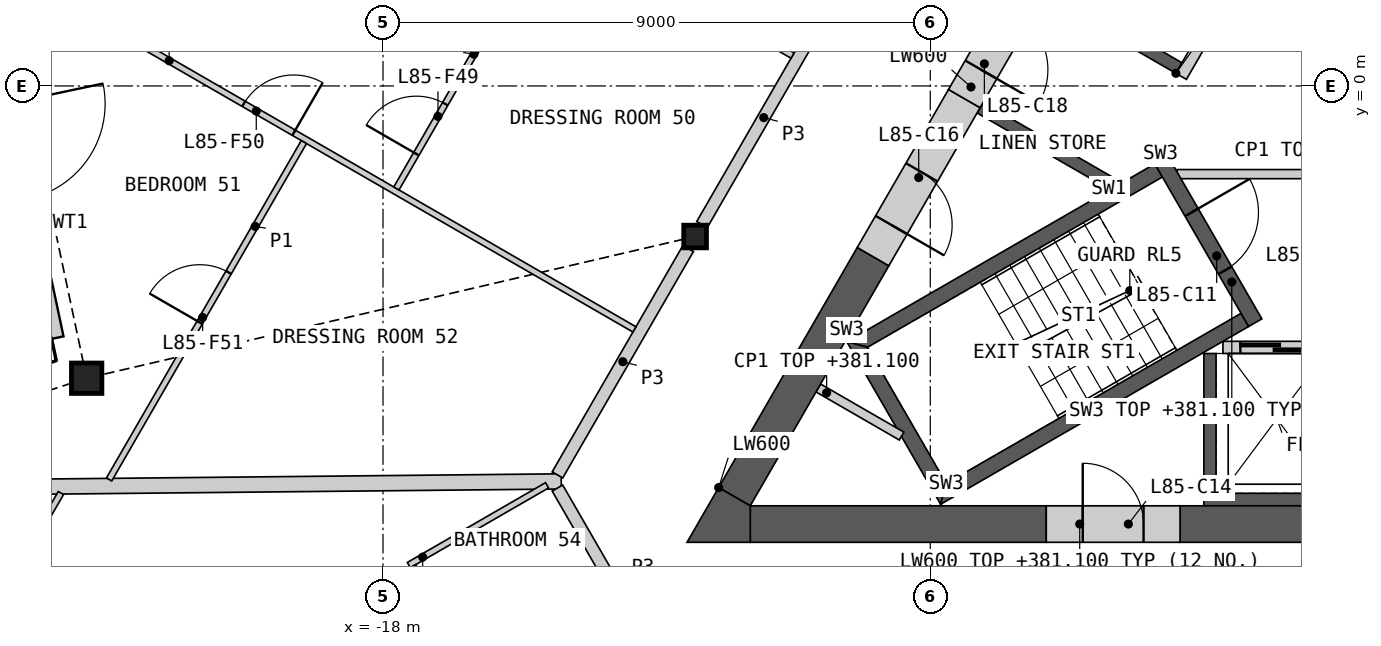
"""IFC4 building model, lengths in metres.
Left out: names, types, materials, properties, quantities, classifications, styles, units other than length and angle.
Written with IfcOpenShell. Run it as: python <this file> out.ifc"""

import sys

from ifc_helpers import new_model, si_unit, direction, frame, frame_2d, origin, origin_2d, place, context, subcontext, project, spatial, polyline, rectangle, hollow_rectangle, i_section, outline, extrude, element, fill, save


model = new_model("IFC4")
c1 = context("Model", 3, precision=1e-05, world=origin(), true_north=direction((0.0, 1.0)))
c2 = subcontext(c1, "Body", "Model", "MODEL_VIEW")
j1 = project(units=[si_unit("LENGTHUNIT", "METRE"), si_unit("PLANEANGLEUNIT", "RADIAN")], contexts=[c1])
p1 = place(None, origin())
s1 = spatial("IfcSite", under=j1, at=p1, CompositionType="ELEMENT")
p2 = place(p1, origin())
s2 = spatial("IfcBuilding", under=s1, at=p2, CompositionType="ELEMENT")
p3 = place(p2, frame((0.0, 0.0, 378.0)))
s3 = spatial("IfcBuildingStorey", under=s2, at=p3, CompositionType="ELEMENT", Elevation=378.0)
p4 = place(p3, frame((-22.874, -4.807, 0.0), z_axis=(0.0, 0.0, 1.0), x_axis=(1.0, 0.0, 0.0)))
e1 = element("IfcColumn", 1, at=p4, inside=s3, PredefinedType="COLUMN", context=c2, shape_type="SweptSolid", body=[
    extrude(hollow_rectangle(XDim=0.5, YDim=0.5, WallThickness=0.03, at=origin_2d()), origin(), (0.0, 0.0, 1.0), 3.4),
])
p5 = place(p3, frame((-12.868, -2.476, 0.0), z_axis=(0.0, 0.0, 1.0), x_axis=(1.0, 0.0, 0.0)))
e2 = element("IfcColumn", 2, at=p5, inside=s3, PredefinedType="COLUMN", context=c2, shape_type="SweptSolid", body=[
    extrude(i_section(OverallWidth=0.374, OverallDepth=0.372, WebThickness=0.016, FlangeThickness=0.026, at=origin_2d()), origin(), (0.0, 0.0, 1.0), 3.4),
])
p6 = place(p3, frame((-24.687, 2.137, 0.0), z_axis=(0.0, 0.0, 1.0), x_axis=(0.207904718109, -0.978149082803, 0.0)))
e3 = element("IfcWall", 3, at=p6, inside=s3, PredefinedType="SOLIDWALL", context=c2, shape_type="SweptSolid", body=[
    extrude(rectangle(XDim=6.416, YDim=0.2, at=frame_2d((3.208, 0.0))), origin(), (0.0, 0.0, 1.0), 2.634),
])
p7 = place(p6, frame((2.484, 0.0, 0.0)))
e4 = element("IfcOpeningElement", 4, at=p7, cuts=e3, PredefinedType="OPENING", context=c2, shape_type="SweptSolid", body=[
    extrude(rectangle(XDim=1.6, YDim=2.25, at=frame_2d((0.8, 1.125))), frame((0.0, 0.11, 0.0), z_axis=(0.0, -1.0, 0.0), x_axis=(1.0, 0.0, 0.0)), (0.0, 0.0, 1.0), 0.22),
])
p8 = place(p3, origin())
e5 = element("IfcWall", 5, at=p8, inside=s3, PredefinedType="SHEAR", context=c2, shape_type="SweptSolid", body=[
    extrude(outline(polyline([(4.5, -4.4), (4.5, -6.906), (-4.5, -6.906), (-4.5, -4.4), (-4.3, -4.4), (-4.3, -6.7), (-2.3, -6.7), (-2.3, -4.4), (-2.1, -4.4), (-2.1, -6.7), (-0.1, -6.7), (-0.1, -4.4), (0.1, -4.4), (0.1, -6.7), (2.1, -6.7), (2.1, -4.4), (2.3, -4.4), (2.3, -6.7), (4.3, -6.7), (4.3, -4.4), (4.5, -4.4)])), origin(), (0.0, 0.0, 1.0), 3.1),
])
p9 = place(p3, frame((-4.187, -4.3, 0.0), z_axis=(0.0, 0.0, 1.0), x_axis=(1.0, 0.0, 0.0)))
e6 = element("IfcWall", 6, at=p9, inside=s3, PredefinedType="SOLIDWALL", context=c2, shape_type="SweptSolid", body=[
    extrude(rectangle(XDim=8.373, YDim=0.2, at=frame_2d((4.187, 0.0))), origin(), (0.0, 0.0, 1.0), 3.1),
])
p10 = place(p9, frame((0.287, 0.0, 0.0)))
e7 = element("IfcOpeningElement", 7, at=p10, cuts=e6, PredefinedType="OPENING", context=c2, shape_type="SweptSolid", body=[
    extrude(rectangle(XDim=1.2, YDim=2.1, at=frame_2d((0.6, 1.05))), frame((0.0, 0.11, 0.0), z_axis=(0.0, -1.0, 0.0), x_axis=(1.0, 0.0, 0.0)), (0.0, 0.0, 1.0), 0.22),
])
p11 = place(p9, frame((2.387, 0.0, 0.0)))
e8 = element("IfcOpeningElement", 8, at=p11, cuts=e6, PredefinedType="OPENING", context=c2, shape_type="SweptSolid", body=[
    extrude(rectangle(XDim=1.4, YDim=2.1, at=frame_2d((0.7, 1.05))), frame((0.0, 0.11, 0.0), z_axis=(0.0, -1.0, 0.0), x_axis=(1.0, 0.0, 0.0)), (0.0, 0.0, 1.0), 0.22),
])
p12 = place(p9, frame((4.737, 0.0, 0.0)))
e9 = element("IfcOpeningElement", 9, at=p12, cuts=e6, PredefinedType="OPENING", context=c2, shape_type="SweptSolid", body=[
    extrude(rectangle(XDim=1.1, YDim=2.1, at=frame_2d((0.55, 1.05))), frame((0.0, 0.11, 0.0), z_axis=(0.0, -1.0, 0.0), x_axis=(1.0, 0.0, 0.0)), (0.0, 0.0, 1.0), 0.22),
])
p13 = place(p9, frame((6.887, 0.0, 0.0)))
e10 = element("IfcOpeningElement", 10, at=p13, cuts=e6, PredefinedType="OPENING", context=c2, shape_type="SweptSolid", body=[
    extrude(rectangle(XDim=1.2, YDim=2.1, at=frame_2d((0.6, 1.05))), frame((0.0, 0.11, 0.0), z_axis=(0.0, -1.0, 0.0), x_axis=(1.0, 0.0, 0.0)), (0.0, 0.0, 1.0), 0.22),
])
p14 = place(p3, origin())
e11 = element("IfcWall", 11, at=p14, inside=s3, PredefinedType="SHEAR", context=c2, shape_type="SweptSolid", body=[
    extrude(outline(polyline([(-6.061, -1.697), (-8.231, -0.444), (-8.131, -0.271), (-5.96, -1.524), (-6.061, -1.697)])), origin(), (0.0, 0.0, 1.0), 3.1),
])
p15 = place(p3, origin())
e12 = element("IfcWall", 12, at=p15, inside=s3, PredefinedType="SHEAR", context=c2, shape_type="SweptSolid", body=[
    extrude(outline(polyline([(-4.96, 0.208), (-7.131, 1.461), (-3.731, 7.35), (-1.561, 6.097), (-1.66, 5.924), (-3.652, 7.074), (-6.852, 1.531), (-4.861, 0.381), (-4.96, 0.208)])), origin(), (0.0, 0.0, 1.0), 3.1),
])
p16 = place(p3, frame((-1.631, 5.776, 0.0), z_axis=(0.0, 0.0, 1.0), x_axis=(-0.499992876559, -0.866029516466, 0.0)))
e13 = element("IfcWall", 13, at=p16, inside=s3, PredefinedType="SOLIDWALL", context=c2, shape_type="SweptSolid", body=[
    extrude(rectangle(XDim=6.486, YDim=0.2, at=frame_2d((3.243, 0.0))), origin(), (0.0, 0.0, 1.0), 3.1),
])
p17 = place(p16, frame((2.637, 0.0, 0.0)))
e14 = element("IfcOpeningElement", 14, at=p17, cuts=e13, PredefinedType="OPENING", context=c2, shape_type="SweptSolid", body=[
    extrude(rectangle(XDim=0.9, YDim=2.1, at=frame_2d((0.45, 1.05))), frame((0.0, 0.11, 0.0), z_axis=(0.0, -1.0, 0.0), x_axis=(1.0, 0.0, 0.0)), (0.0, 0.0, 1.0), 0.22),
])
p18 = place(p3, frame((-4.941, -1.45, 0.0), z_axis=(0.0, 0.0, 1.0), x_axis=(1.0, 0.0, 0.0)))
e15 = element("IfcWall", 15, at=p18, inside=s3, PredefinedType="PARTITIONING", context=c2, shape_type="SweptSolid", body=[
    extrude(rectangle(XDim=9.882, YDim=0.15, at=frame_2d((4.941, 0.0))), origin(), (0.0, 0.0, 1.0), 3.1),
])
p19 = place(p18, frame((4.391, 0.0, 0.0)))
e16 = element("IfcOpeningElement", 16, at=p19, cuts=e15, PredefinedType="OPENING", context=c2, shape_type="SweptSolid", body=[
    extrude(rectangle(XDim=1.1, YDim=2.1, at=frame_2d((0.55, 1.05))), frame((0.0, 0.085, 0.0), z_axis=(0.0, -1.0, 0.0), x_axis=(1.0, 0.0, 0.0)), (0.0, 0.0, 1.0), 0.17),
])
p20 = place(p3, origin())
e17 = element("IfcWall", 17, at=p20, inside=s3, PredefinedType="SHEAR", context=c2, shape_type="SweptSolid", body=[
    extrude(outline(polyline([(-5.307, -1.281), (-10.374, -4.206), (-10.032, -4.298), (-5.182, -1.498), (-5.307, -1.281)])), origin(), (0.0, 0.0, 1.0), 3.1),
])
p21 = place(p3, origin())
e18 = element("IfcWall", 18, at=p21, inside=s3, PredefinedType="SHEAR", context=c2, shape_type="SweptSolid", body=[
    extrude(outline(polyline([(-10.374, -4.206), (-8.83, -6.881), (-8.738, -6.539), (-10.032, -4.298), (-10.374, -4.206)])), origin(), (0.0, 0.0, 1.0), 3.1),
])
p22 = place(p3, origin())
e19 = element("IfcWall", 19, at=p22, inside=s3, PredefinedType="SHEAR", context=c2, shape_type="SweptSolid", body=[
    extrude(outline(polyline([(-8.738, -6.539), (-8.83, -6.881), (-3.763, -3.956), (-3.888, -3.739), (-8.738, -6.539)])), origin(), (0.0, 0.0, 1.0), 3.1),
])
p23 = place(p3, frame((-5.199, -1.219, 0.0), z_axis=(0.0, 0.0, 1.0), x_axis=(0.499982516597, -0.866035497597, 0.0)))
e20 = element("IfcWall", 20, at=p23, inside=s3, PredefinedType="SHEAR", context=c2, shape_type="SweptSolid", body=[
    extrude(rectangle(XDim=3.088, YDim=0.25, at=frame_2d((1.544, 0.0))), origin(), (0.0, 0.0, 1.0), 3.1),
])
p24 = place(p23, frame((0.994, 0.0, 0.0)))
e21 = element("IfcOpeningElement", 21, at=p24, cuts=e20, PredefinedType="OPENING", context=c2, shape_type="SweptSolid", body=[
    extrude(rectangle(XDim=1.1, YDim=2.1, at=frame_2d((0.55, 1.05))), frame((0.0, 0.135, 0.0), z_axis=(0.0, -1.0, 0.0), x_axis=(1.0, 0.0, 0.0)), (0.0, 0.0, 1.0), 0.27),
])
p25 = place(p3, frame((-10.842, -4.967, 0.0), z_axis=(0.0, 0.0, 1.0), x_axis=(0.866098216386, -0.499873863663, 0.0)))
e22 = element("IfcWall", 22, at=p25, inside=s3, PredefinedType="PARTITIONING", context=c2, shape_type="SweptSolid", body=[
    extrude(rectangle(XDim=1.582, YDim=0.15, at=frame_2d((0.791, 0.0))), origin(), (0.0, 0.0, 1.0), 3.1),
])
p26 = place(p3, frame((-4.892, -7.206, 0.0), z_axis=(0.0, 0.0, 1.0), x_axis=(1.0, 0.0, 0.0)))
e23 = element("IfcWall", 23, at=p26, inside=s3, PredefinedType="SHEAR", context=c2, shape_type="SweptSolid", body=[
    extrude(rectangle(XDim=16.853, YDim=0.6, at=frame_2d((8.426, 0.0))), origin(), (0.0, 0.0, 1.0), 3.1),
])
p27 = place(p3, frame((-11.961, -7.206, 0.0), z_axis=(0.0, 0.0, 1.0), x_axis=(1.0, 0.0, 0.0)))
e24 = element("IfcWall", 24, at=p27, inside=s3, PredefinedType="SHEAR", context=c2, shape_type="SweptSolid", body=[
    extrude(rectangle(XDim=4.868, YDim=0.6, at=frame_2d((2.434, 0.0))), origin(), (0.0, 0.0, 1.0), 3.1),
])
p28 = place(p3, frame((-9.941, -2.807, 0.0), z_axis=(0.0, 0.0, 1.0), x_axis=(-0.500020646047, -0.866013483456, 0.0)))
e25 = element("IfcWall", 25, at=p28, inside=s3, PredefinedType="SHEAR", context=c2, shape_type="SweptSolid", body=[
    extrude(rectangle(XDim=4.559, YDim=0.6, at=frame_2d((2.28, 0.0))), origin(), (0.0, 0.0, 1.0), 3.1),
])
p29 = place(p3, origin())
e26 = element("IfcWall", 26, at=p29, inside=s3, PredefinedType="SHEAR", context=c2, shape_type="SweptSolid", body=[
    extrude(outline(polyline([(-12.48, -6.606), (-11.961, -6.906), (-11.961, -7.506), (-13.0, -7.506), (-12.48, -6.606)])), origin(), (0.0, 0.0, 1.0), 3.1),
])
p30 = place(p3, frame((-7.092, -7.206, 0.0), z_axis=(0.0, 0.0, 1.0), x_axis=(1.0, 0.0, 0.0)))
e27 = element("IfcWall", 27, at=p30, inside=s3, PredefinedType="SHEAR", context=c2, shape_type="SweptSolid", body=[
    extrude(rectangle(XDim=2.2, YDim=0.6, at=frame_2d((1.1, 0.0))), origin(), (0.0, 0.0, 1.0), 3.1),
])
p31 = place(p30, frame((0.6, 0.0, 0.0)))
e28 = element("IfcOpeningElement", 28, at=p31, cuts=e27, PredefinedType="OPENING", context=c2, shape_type="SweptSolid", body=[
    extrude(rectangle(XDim=1.0, YDim=2.1, at=frame_2d((0.5, 1.05))), frame((0.0, 0.31, 0.0), z_axis=(0.0, -1.0, 0.0), x_axis=(1.0, 0.0, 0.0)), (0.0, 0.0, 1.0), 0.62),
])
p32 = place(p3, frame((-8.44, -0.208, 0.0), z_axis=(0.0, 0.0, 1.0), x_axis=(-0.499997052475, -0.866027105532, 0.0)))
e29 = element("IfcWall", 29, at=p32, inside=s3, PredefinedType="SHEAR", context=c2, shape_type="SweptSolid", body=[
    extrude(rectangle(XDim=3.001, YDim=0.6, at=frame_2d((1.501, 0.0))), origin(), (0.0, 0.0, 1.0), 3.1),
])
p33 = place(p32, frame((1.4, 0.0, 0.0)))
e30 = element("IfcOpeningElement", 30, at=p33, cuts=e29, PredefinedType="OPENING", context=c2, shape_type="SweptSolid", body=[
    extrude(rectangle(XDim=1.0, YDim=2.1, at=frame_2d((0.5, 1.05))), frame((0.0, 0.31, 0.0), z_axis=(0.0, -1.0, 0.0), x_axis=(1.0, 0.0, 0.0)), (0.0, 0.0, 1.0), 0.62),
])
p34 = place(p3, frame((-7.34, 1.698, 0.0), z_axis=(0.0, 0.0, 1.0), x_axis=(-0.50002983664, -0.866008176907, 0.0)))
e31 = element("IfcWall", 31, at=p34, inside=s3, PredefinedType="SHEAR", context=c2, shape_type="SweptSolid", body=[
    extrude(rectangle(XDim=2.2, YDim=0.6, at=frame_2d((1.1, 0.0))), origin(), (0.0, 0.0, 1.0), 3.1),
])
p35 = place(p34, frame((0.55, 0.0, 0.0)))
e32 = element("IfcOpeningElement", 32, at=p35, cuts=e31, PredefinedType="OPENING", context=c2, shape_type="SweptSolid", body=[
    extrude(rectangle(XDim=1.1, YDim=2.1, at=frame_2d((0.55, 1.05))), frame((0.0, 0.31, 0.0), z_axis=(0.0, -1.0, 0.0), x_axis=(1.0, 0.0, 0.0)), (0.0, 0.0, 1.0), 0.62),
])
p36 = place(p3, frame((-29.883, -6.654, 0.0), z_axis=(0.0, 0.0, 1.0), x_axis=(0.999949143254, 0.010085182526, 0.0)))
e33 = element("IfcWall", 33, at=p36, inside=s3, PredefinedType="PARTITIONING", context=c2, shape_type="SweptSolid", body=[
    extrude(rectangle(XDim=14.815, YDim=0.25, at=frame_2d((7.408, 0.0))), origin(), (0.0, 0.0, 1.0), 2.33),
])
p37 = place(p3, frame((-12.754, -2.279, 0.0), z_axis=(0.0, 0.0, 1.0), x_axis=(0.500001682468, 0.866024432409, 0.0)))
e34 = element("IfcWall", 34, at=p37, inside=s3, PredefinedType="PARTITIONING", context=c2, shape_type="SweptSolid", body=[
    extrude(rectangle(XDim=8.124, YDim=0.2, at=frame_2d((4.062, 0.0))), origin(), (0.0, 0.0, 1.0), 3.1),
])
p38 = place(p37, frame((3.762, 0.0, 0.0)))
e35 = element("IfcOpeningElement", 35, at=p38, cuts=e34, PredefinedType="OPENING", context=c2, shape_type="SweptSolid", body=[
    extrude(rectangle(XDim=1.0, YDim=2.1, at=frame_2d((0.5, 1.05))), frame((0.0, 0.11, 0.0), z_axis=(0.0, -1.0, 0.0), x_axis=(1.0, 0.0, 0.0)), (0.0, 0.0, 1.0), 0.22),
])
p39 = place(p3, frame((-15.131, -6.397, 0.0), z_axis=(0.0, 0.0, 1.0), x_axis=(0.499986217557, 0.866033360935, 0.0)))
e36 = element("IfcWall", 36, at=p39, inside=s3, PredefinedType="PARTITIONING", context=c2, shape_type="SweptSolid", body=[
    extrude(rectangle(XDim=4.3, YDim=0.2, at=frame_2d((2.15, 0.0))), origin(), (0.0, 0.0, 1.0), 3.1),
])
p40 = place(p3, frame((-15.131, -6.614, 0.0), z_axis=(0.0, 0.0, 1.0), x_axis=(0.499967746641, -0.866044024469, 0.0)))
e37 = element("IfcWall", 37, at=p40, inside=s3, PredefinedType="PARTITIONING", context=c2, shape_type="SweptSolid", body=[
    extrude(rectangle(XDim=3.676, YDim=0.2, at=frame_2d((1.838, 0.0))), origin(), (0.0, 0.0, 1.0), 3.1),
])
p41 = place(p40, frame((2.426, 0.0, 0.0)))
e38 = element("IfcOpeningElement", 38, at=p41, cuts=e37, PredefinedType="OPENING", context=c2, shape_type="SweptSolid", body=[
    extrude(rectangle(XDim=1.0, YDim=2.1, at=frame_2d((0.5, 1.05))), frame((0.0, 0.11, 0.0), z_axis=(0.0, -1.0, 0.0), x_axis=(1.0, 0.0, 0.0)), (0.0, 0.0, 1.0), 0.22),
])
p42 = place(p3, frame((-24.069, 1.887, 0.0), z_axis=(0.0, 0.0, 1.0), x_axis=(0.866023404247, -0.500003463284, 0.0)))
e39 = element("IfcWall", 39, at=p42, inside=s3, PredefinedType="PARTITIONING", context=c2, shape_type="SweptSolid", body=[
    extrude(rectangle(XDim=11.782, YDim=0.1, at=frame_2d((5.891, 0.0))), origin(), (0.0, 0.0, 1.0), 2.33),
])
p43 = place(p42, frame((4.363, 0.0, 0.0)))
e40 = element("IfcOpeningElement", 40, at=p43, cuts=e39, PredefinedType="OPENING", context=c2, shape_type="SweptSolid", body=[
    extrude(rectangle(XDim=0.95, YDim=2.1, at=frame_2d((0.475, 1.05))), frame((0.0, 0.06, 0.0), z_axis=(0.0, -1.0, 0.0), x_axis=(1.0, 0.0, 0.0)), (0.0, 0.0, 1.0), 0.12),
])
p44 = place(p3, frame((-17.414, 4.049, 0.0), z_axis=(0.0, 0.0, 1.0), x_axis=(0.866033839264, -0.499985389037, 0.0)))
e41 = element("IfcWall", 41, at=p44, inside=s3, PredefinedType="PARTITIONING", context=c2, shape_type="SweptSolid", body=[
    extrude(rectangle(XDim=7.1, YDim=0.1, at=frame_2d((3.55, 0.0))), origin(), (0.0, 0.0, 1.0), 2.33),
])
p45 = place(p44, frame((1.158, 0.0, 0.0)))
e42 = element("IfcOpeningElement", 42, at=p45, cuts=e41, PredefinedType="OPENING", context=c2, shape_type="SweptSolid", body=[
    extrude(rectangle(XDim=0.95, YDim=2.1, at=frame_2d((0.475, 1.05))), frame((0.0, 0.06, 0.0), z_axis=(0.0, -1.0, 0.0), x_axis=(1.0, 0.0, 0.0)), (0.0, 0.0, 1.0), 0.12),
])
p46 = place(p3, frame((-22.505, -6.472, 0.0), z_axis=(0.0, 0.0, 1.0), x_axis=(0.499999516514, 0.866025682925, 0.0)))
e43 = element("IfcWall", 43, at=p46, inside=s3, PredefinedType="PARTITIONING", context=c2, shape_type="SweptSolid", body=[
    extrude(rectangle(XDim=6.407, YDim=0.1, at=frame_2d((3.204, 0.0))), origin(), (0.0, 0.0, 1.0), 2.33),
])
p47 = place(p46, frame((2.981, 0.0, 0.0)))
e44 = element("IfcOpeningElement", 44, at=p47, cuts=e43, PredefinedType="OPENING", context=c2, shape_type="SweptSolid", body=[
    extrude(rectangle(XDim=0.95, YDim=2.1, at=frame_2d((0.475, 1.05))), frame((0.0, 0.06, 0.0), z_axis=(0.0, -1.0, 0.0), x_axis=(1.0, 0.0, 0.0)), (0.0, 0.0, 1.0), 0.12),
])
p48 = place(p3, frame((-17.78, -1.686, 0.0), z_axis=(0.0, 0.0, 1.0), x_axis=(0.500005610874, 0.86602216432, 0.0)))
e45 = element("IfcWall", 45, at=p48, inside=s3, PredefinedType="PARTITIONING", context=c2, shape_type="SweptSolid", body=[
    extrude(rectangle(XDim=5.1, YDim=0.1, at=frame_2d((2.55, 0.0))), origin(), (0.0, 0.0, 1.0), 2.33),
])
p49 = place(p48, frame((0.656, 0.0, 0.0)))
e46 = element("IfcOpeningElement", 46, at=p49, cuts=e45, PredefinedType="OPENING", context=c2, shape_type="SweptSolid", body=[
    extrude(rectangle(XDim=0.95, YDim=2.1, at=frame_2d((0.475, 1.05))), frame((0.0, 0.06, 0.0), z_axis=(0.0, -1.0, 0.0), x_axis=(1.0, 0.0, 0.0)), (0.0, 0.0, 1.0), 0.12),
])
p50 = place(p3, frame((-24.726, -9.169, 0.0), z_axis=(0.0, 0.0, 1.0), x_axis=(0.499971481985, 0.866041868042, 0.0)))
e47 = element("IfcWall", 47, at=p50, inside=s3, PredefinedType="PARTITIONING", context=c2, shape_type="SweptSolid", body=[
    extrude(rectangle(XDim=2.857, YDim=0.1, at=frame_2d((1.429, 0.0))), origin(), (0.0, 0.0, 1.0), 2.33),
])
p51 = place(p3, frame((-17.575, -7.881, 0.0), z_axis=(0.0, 0.0, 1.0), x_axis=(0.866036909293, 0.499980071345, 0.0)))
e48 = element("IfcWall", 48, at=p51, inside=s3, PredefinedType="PARTITIONING", context=c2, shape_type="SweptSolid", body=[
    extrude(rectangle(XDim=2.625, YDim=0.1, at=frame_2d((1.312, 0.0))), origin(), (0.0, 0.0, 1.0), 2.33),
])
p52 = place(p3, frame((-17.507, -7.899, 0.0), z_axis=(0.0, 0.0, 1.0), x_axis=(0.500011643316, -0.866018681408, 0.0)))
e49 = element("IfcWall", 49, at=p52, inside=s3, PredefinedType="PARTITIONING", context=c2, shape_type="SweptSolid", body=[
    extrude(rectangle(XDim=1.973, YDim=0.1, at=frame_2d((0.987, 0.0))), origin(), (0.0, 0.0, 1.0), 2.33),
])
p53 = place(p10, origin())
e50 = element("IfcDoor", 50, at=p53, inside=s3, OperationType="SLIDING_TO_LEFT", PredefinedType="DOOR", context=c2, shape_type="SweptSolid", body=[
    extrude(rectangle(XDim=1.2, YDim=2.1, at=frame_2d((0.6, 1.05))), frame((0.0, 0.025, 0.0), z_axis=(0.0, -1.0, 0.0), x_axis=(1.0, 0.0, 0.0)), (0.0, 0.0, 1.0), 0.05),
])
fill(e7, e50)
p54 = place(p24, origin())
e51 = element("IfcDoor", 51, at=p54, inside=s3, OperationType="SINGLE_SWING_LEFT", PredefinedType="DOOR", context=c2, shape_type="SweptSolid", body=[
    extrude(rectangle(XDim=1.1, YDim=2.1, at=frame_2d((0.55, 1.05))), frame((0.0, 0.025, 0.0), z_axis=(0.0, -1.0, 0.0), x_axis=(1.0, 0.0, 0.0)), (0.0, 0.0, 1.0), 0.05),
])
fill(e21, e51)
p55 = place(p31, origin())
e52 = element("IfcDoor", 52, at=p55, inside=s3, OperationType="SINGLE_SWING_LEFT", PredefinedType="DOOR", context=c2, shape_type="SweptSolid", body=[
    extrude(rectangle(XDim=1.0, YDim=2.1, at=frame_2d((0.5, 1.05))), frame((0.0, 0.055, 0.0), z_axis=(0.0, -1.0, 0.0), x_axis=(1.0, 0.0, 0.0)), (0.0, 0.0, 1.0), 0.05),
])
fill(e28, e52)
p56 = place(p33, origin())
e53 = element("IfcDoor", 53, at=p56, inside=s3, OperationType="SINGLE_SWING_RIGHT", PredefinedType="DOOR", context=c2, shape_type="SweptSolid", body=[
    extrude(rectangle(XDim=1.0, YDim=2.1, at=frame_2d((0.5, 1.05))), frame((0.0, 0.055, 0.0), z_axis=(0.0, -1.0, 0.0), x_axis=(1.0, 0.0, 0.0)), (0.0, 0.0, 1.0), 0.05),
])
fill(e30, e53)
p57 = place(p35, origin())
e54 = element("IfcDoor", 54, at=p57, inside=s3, OperationType="SINGLE_SWING_RIGHT", PredefinedType="DOOR", context=c2, shape_type="SweptSolid", body=[
    extrude(rectangle(XDim=1.1, YDim=2.1, at=frame_2d((0.55, 1.05))), frame((0.0, 0.055, 0.0), z_axis=(0.0, -1.0, 0.0), x_axis=(1.0, 0.0, 0.0)), (0.0, 0.0, 1.0), 0.05),
])
fill(e32, e54)
p58 = place(p49, origin())
e55 = element("IfcDoor", 55, at=p58, inside=s3, OperationType="SINGLE_SWING_LEFT", PredefinedType="DOOR", context=c2, shape_type="SweptSolid", body=[
    extrude(rectangle(XDim=0.95, YDim=2.1, at=frame_2d((0.475, 1.05))), frame((0.0, 0.025, 0.0), z_axis=(0.0, -1.0, 0.0), x_axis=(1.0, 0.0, 0.0)), (0.0, 0.0, 1.0), 0.05),
])
fill(e46, e55)
p59 = place(p43, origin())
e56 = element("IfcDoor", 56, at=p59, inside=s3, OperationType="SINGLE_SWING_RIGHT", PredefinedType="DOOR", context=c2, shape_type="SweptSolid", body=[
    extrude(rectangle(XDim=0.95, YDim=2.1, at=frame_2d((0.475, 1.05))), frame((0.0, 0.025, 0.0), z_axis=(0.0, -1.0, 0.0), x_axis=(1.0, 0.0, 0.0)), (0.0, 0.0, 1.0), 0.05),
])
fill(e40, e56)
p60 = place(p47, origin())
e57 = element("IfcDoor", 57, at=p60, inside=s3, OperationType="SINGLE_SWING_LEFT", PredefinedType="DOOR", context=c2, shape_type="SweptSolid", body=[
    extrude(rectangle(XDim=0.95, YDim=2.1, at=frame_2d((0.475, 1.05))), frame((0.0, 0.025, 0.0), z_axis=(0.0, -1.0, 0.0), x_axis=(1.0, 0.0, 0.0)), (0.0, 0.0, 1.0), 0.05),
])
fill(e44, e57)
save(model, sys.argv[1])
